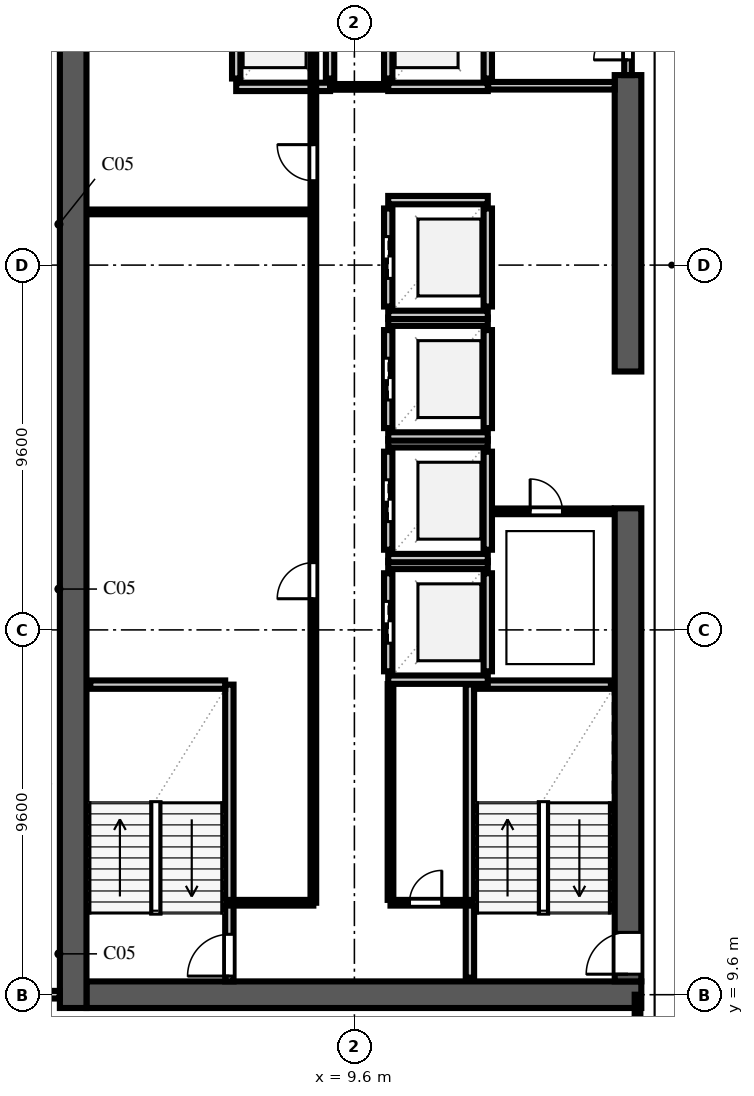
"""IFC4 building model, lengths in metres.
Left out: names, types, materials, properties, quantities, classifications, styles, units other than length and angle.
Written with IfcOpenShell. Run it as: python <this file> out.ifc"""

import sys

from ifc_helpers import new_model, si_unit, direction, frame, frame_2d, origin, place, context, subcontext, project, spatial, rectangle, extrude, element, fill, save


model = new_model("IFC4")
c1 = context("Model", 3, precision=1e-05, world=origin(), true_north=direction((0.0, 1.0)))
c2 = subcontext(c1, "Body", "Model", "MODEL_VIEW")
j1 = project(units=[si_unit("LENGTHUNIT", "METRE"), si_unit("PLANEANGLEUNIT", "RADIAN")], contexts=[c1])
p1 = place(None, origin())
s1 = spatial("IfcSite", under=j1, at=p1, CompositionType="ELEMENT")
p2 = place(p1, origin())
s2 = spatial("IfcBuilding", under=s1, at=p2, CompositionType="ELEMENT")
p3 = place(p2, frame((0.0, 0.0, 171.2)))
s3 = spatial("IfcBuildingStorey", under=s2, at=p3, CompositionType="ELEMENT", Elevation=171.2)
p4 = place(p3, frame((2.55, 9.6, 0.0), z_axis=(0.0, 0.0, 1.0), x_axis=(1.0, 0.0, 0.0)))
e1 = element("IfcWall", 1, at=p4, inside=s3, PredefinedType="SHEAR", context=c2, shape_type="SweptSolid", body=[
    extrude(rectangle(XDim=14.6, YDim=0.7, at=frame_2d((7.3, 0.0))), origin(), (0.0, 0.0, 1.0), 3.54),
])
p5 = place(p3, frame((2.2, 9.25, 0.0), z_axis=(0.0, 0.0, 1.0), x_axis=(0.0, 1.0, 0.0)))
e2 = element("IfcWall", 2, at=p5, inside=s3, PredefinedType="SHEAR", context=c2, shape_type="SweptSolid", body=[
    extrude(rectangle(XDim=39.1, YDim=0.7, at=frame_2d((19.55, 0.0))), origin(), (0.0, 0.0, 1.0), 3.54),
])
p6 = place(p3, frame((16.8, 9.95, 0.0), z_axis=(0.0, 0.0, 1.0), x_axis=(0.0, 1.0, 0.0)))
e3 = element("IfcWall", 3, at=p6, inside=s3, PredefinedType="SHEAR", context=c2, shape_type="SweptSolid", body=[
    extrude(rectangle(XDim=12.45, YDim=0.7, at=frame_2d((6.225, 0.0))), origin(), (0.0, 0.0, 1.0), 3.54),
])
p7 = place(p6, frame((0.19, 0.0, 0.0)))
e4 = element("IfcOpeningElement", 4, at=p7, cuts=e3, PredefinedType="OPENING", context=c2, shape_type="SweptSolid", body=[
    extrude(rectangle(XDim=1.1, YDim=2.2, at=frame_2d((0.55, 1.1))), frame((0.0, 0.362, 0.0), z_axis=(0.0, -1.0, 0.0), x_axis=(1.0, 0.0, 0.0)), (0.0, 0.0, 1.0), 0.724),
])
p8 = place(p3, frame((16.8, 26.0, 0.0), z_axis=(0.0, 0.0, 1.0), x_axis=(0.0, 1.0, 0.0)))
e5 = element("IfcWall", 5, at=p8, inside=s3, PredefinedType="SHEAR", context=c2, shape_type="SweptSolid", body=[
    extrude(rectangle(XDim=7.8, YDim=0.7, at=frame_2d((3.9, 0.0))), origin(), (0.0, 0.0, 1.0), 3.54),
])
p9 = place(p3, frame((6.31, 9.95, 0.0), z_axis=(0.0, 0.0, 1.0), x_axis=(0.0, 1.0, 0.0)))
e6 = element("IfcWall", 6, at=p9, inside=s3, PredefinedType="SOLIDWALL", context=c2, shape_type="SweptSolid", body=[
    extrude(rectangle(XDim=7.81, YDim=0.22, at=frame_2d((3.905, 0.0))), origin(), (0.0, 0.0, 1.0), 3.54),
])
p10 = place(p9, frame((0.14, 0.0, 0.0)))
e7 = element("IfcOpeningElement", 7, at=p10, cuts=e6, PredefinedType="OPENING", context=c2, shape_type="SweptSolid", body=[
    extrude(rectangle(XDim=1.1, YDim=2.2, at=frame_2d((0.55, 1.1))), frame((0.0, 0.122, 0.0), z_axis=(0.0, -1.0, 0.0), x_axis=(1.0, 0.0, 0.0)), (0.0, 0.0, 1.0), 0.244),
])
p11 = place(p3, frame((2.65, 17.76, 0.0), z_axis=(0.0, 0.0, 1.0), x_axis=(1.0, 0.0, 0.0)))
e8 = element("IfcWall", 8, at=p11, inside=s3, PredefinedType="SOLIDWALL", context=c2, shape_type="SweptSolid", body=[
    extrude(rectangle(XDim=3.55, YDim=0.22, at=frame_2d((1.775, 0.0))), origin(), (0.0, 0.0, 1.0), 3.54),
])
p12 = place(p3, frame((12.64, 10.05, 0.0), z_axis=(0.0, 0.0, 1.0), x_axis=(0.0, 1.0, 0.0)))
e9 = element("IfcWall", 9, at=p12, inside=s3, PredefinedType="SOLIDWALL", context=c2, shape_type="SweptSolid", body=[
    extrude(rectangle(XDim=7.71, YDim=0.22, at=frame_2d((3.855, 0.0))), origin(), (0.0, 0.0, 1.0), 3.54),
])
p13 = place(p3, frame((12.75, 17.76, 0.0), z_axis=(0.0, 0.0, 1.0), x_axis=(1.0, 0.0, 0.0)))
e10 = element("IfcWall", 10, at=p13, inside=s3, PredefinedType="SOLIDWALL", context=c2, shape_type="SweptSolid", body=[
    extrude(rectangle(XDim=3.6, YDim=0.22, at=frame_2d((1.8, 0.0))), origin(), (0.0, 0.0, 1.0), 3.54),
])
p14 = place(p3, frame((10.49, 18.11, 0.0), z_axis=(0.0, 0.0, 1.0), x_axis=(0.0, 1.0, 0.0)))
e11 = element("IfcWall", 11, at=p14, inside=s3, PredefinedType="SOLIDWALL", context=c2, shape_type="SweptSolid", body=[
    extrude(rectangle(XDim=2.58, YDim=0.22, at=frame_2d((1.29, 0.0))), origin(), (0.0, 0.0, 1.0), 3.54),
])
p15 = place(p14, frame((0.74, 0.0, 0.0)))
e12 = element("IfcOpeningElement", 12, at=p15, cuts=e11, PredefinedType="OPENING", context=c2, shape_type="SweptSolid", body=[
    extrude(rectangle(XDim=1.1, YDim=2.2, at=frame_2d((0.55, 1.1))), frame((0.0, 0.122, 0.0), z_axis=(0.0, -1.0, 0.0), x_axis=(1.0, 0.0, 0.0)), (0.0, 0.0, 1.0), 0.244),
])
p16 = place(p3, frame((13.11, 18.11, 0.0), z_axis=(0.0, 0.0, 1.0), x_axis=(0.0, 1.0, 0.0)))
e13 = element("IfcWall", 13, at=p16, inside=s3, PredefinedType="SOLIDWALL", context=c2, shape_type="SweptSolid", body=[
    extrude(rectangle(XDim=2.58, YDim=0.22, at=frame_2d((1.29, 0.0))), origin(), (0.0, 0.0, 1.0), 3.54),
])
for number, where, z_axis, x_axis in (
    (14, (10.49, 17.89, 0.0), (0.0, 0.0, 1.0), (1.0, 0.0, 0.0)),
    (15, (10.49, 20.91, 0.0), (0.0, 0.0, 1.0), (1.0, 0.0, 0.0)),
):
    element("IfcWall", number, at=place(p3, frame(where, z_axis=z_axis, x_axis=x_axis)), inside=s3, PredefinedType="SOLIDWALL", context=c2, shape_type="SweptSolid", body=[
        extrude(rectangle(XDim=2.62, YDim=0.22, at=frame_2d((1.31, 0.0))), origin(), (0.0, 0.0, 1.0), 3.54),
    ])
p17 = place(p3, frame((10.49, 21.31, 0.0), z_axis=(0.0, 0.0, 1.0), x_axis=(0.0, 1.0, 0.0)))
e16 = element("IfcWall", 16, at=p17, inside=s3, PredefinedType="SOLIDWALL", context=c2, shape_type="SweptSolid", body=[
    extrude(rectangle(XDim=2.58, YDim=0.22, at=frame_2d((1.29, 0.0))), origin(), (0.0, 0.0, 1.0), 3.54),
])
p18 = place(p17, frame((0.74, 0.0, 0.0)))
e17 = element("IfcOpeningElement", 17, at=p18, cuts=e16, PredefinedType="OPENING", context=c2, shape_type="SweptSolid", body=[
    extrude(rectangle(XDim=1.1, YDim=2.2, at=frame_2d((0.55, 1.1))), frame((0.0, 0.122, 0.0), z_axis=(0.0, -1.0, 0.0), x_axis=(1.0, 0.0, 0.0)), (0.0, 0.0, 1.0), 0.244),
])
p19 = place(p3, frame((13.11, 21.31, 0.0), z_axis=(0.0, 0.0, 1.0), x_axis=(0.0, 1.0, 0.0)))
e18 = element("IfcWall", 18, at=p19, inside=s3, PredefinedType="SOLIDWALL", context=c2, shape_type="SweptSolid", body=[
    extrude(rectangle(XDim=2.58, YDim=0.22, at=frame_2d((1.29, 0.0))), origin(), (0.0, 0.0, 1.0), 3.54),
])
for number, where, z_axis, x_axis in (
    (19, (10.49, 21.09, 0.0), (0.0, 0.0, 1.0), (1.0, 0.0, 0.0)),
    (20, (10.49, 24.11, 0.0), (0.0, 0.0, 1.0), (1.0, 0.0, 0.0)),
):
    element("IfcWall", number, at=place(p3, frame(where, z_axis=z_axis, x_axis=x_axis)), inside=s3, PredefinedType="SOLIDWALL", context=c2, shape_type="SweptSolid", body=[
        extrude(rectangle(XDim=2.62, YDim=0.22, at=frame_2d((1.31, 0.0))), origin(), (0.0, 0.0, 1.0), 3.54),
    ])
p20 = place(p3, frame((10.49, 24.51, 0.0), z_axis=(0.0, 0.0, 1.0), x_axis=(0.0, 1.0, 0.0)))
e21 = element("IfcWall", 21, at=p20, inside=s3, PredefinedType="SOLIDWALL", context=c2, shape_type="SweptSolid", body=[
    extrude(rectangle(XDim=2.58, YDim=0.22, at=frame_2d((1.29, 0.0))), origin(), (0.0, 0.0, 1.0), 3.54),
])
p21 = place(p20, frame((0.74, 0.0, 0.0)))
e22 = element("IfcOpeningElement", 22, at=p21, cuts=e21, PredefinedType="OPENING", context=c2, shape_type="SweptSolid", body=[
    extrude(rectangle(XDim=1.1, YDim=2.2, at=frame_2d((0.55, 1.1))), frame((0.0, 0.122, 0.0), z_axis=(0.0, -1.0, 0.0), x_axis=(1.0, 0.0, 0.0)), (0.0, 0.0, 1.0), 0.244),
])
p22 = place(p3, frame((13.11, 24.51, 0.0), z_axis=(0.0, 0.0, 1.0), x_axis=(0.0, 1.0, 0.0)))
e23 = element("IfcWall", 23, at=p22, inside=s3, PredefinedType="SOLIDWALL", context=c2, shape_type="SweptSolid", body=[
    extrude(rectangle(XDim=2.58, YDim=0.22, at=frame_2d((1.29, 0.0))), origin(), (0.0, 0.0, 1.0), 3.54),
])
for number, where, z_axis, x_axis in (
    (24, (10.49, 24.29, 0.0), (0.0, 0.0, 1.0), (1.0, 0.0, 0.0)),
    (25, (10.49, 27.31, 0.0), (0.0, 0.0, 1.0), (1.0, 0.0, 0.0)),
):
    element("IfcWall", number, at=place(p3, frame(where, z_axis=z_axis, x_axis=x_axis)), inside=s3, PredefinedType="SOLIDWALL", context=c2, shape_type="SweptSolid", body=[
        extrude(rectangle(XDim=2.62, YDim=0.22, at=frame_2d((1.31, 0.0))), origin(), (0.0, 0.0, 1.0), 3.54),
    ])
p23 = place(p3, frame((10.49, 27.71, 0.0), z_axis=(0.0, 0.0, 1.0), x_axis=(0.0, 1.0, 0.0)))
e26 = element("IfcWall", 26, at=p23, inside=s3, PredefinedType="SOLIDWALL", context=c2, shape_type="SweptSolid", body=[
    extrude(rectangle(XDim=2.58, YDim=0.22, at=frame_2d((1.29, 0.0))), origin(), (0.0, 0.0, 1.0), 3.54),
])
p24 = place(p23, frame((0.74, 0.0, 0.0)))
e27 = element("IfcOpeningElement", 27, at=p24, cuts=e26, PredefinedType="OPENING", context=c2, shape_type="SweptSolid", body=[
    extrude(rectangle(XDim=1.1, YDim=2.2, at=frame_2d((0.55, 1.1))), frame((0.0, 0.122, 0.0), z_axis=(0.0, -1.0, 0.0), x_axis=(1.0, 0.0, 0.0)), (0.0, 0.0, 1.0), 0.244),
])
p25 = place(p3, frame((13.11, 27.71, 0.0), z_axis=(0.0, 0.0, 1.0), x_axis=(0.0, 1.0, 0.0)))
e28 = element("IfcWall", 28, at=p25, inside=s3, PredefinedType="SOLIDWALL", context=c2, shape_type="SweptSolid", body=[
    extrude(rectangle(XDim=2.58, YDim=0.22, at=frame_2d((1.29, 0.0))), origin(), (0.0, 0.0, 1.0), 3.54),
])
for number, where, z_axis, x_axis in (
    (29, (10.49, 27.49, 0.0), (0.0, 0.0, 1.0), (1.0, 0.0, 0.0)),
    (30, (10.49, 30.51, 0.0), (0.0, 0.0, 1.0), (1.0, 0.0, 0.0)),
):
    element("IfcWall", number, at=place(p3, frame(where, z_axis=z_axis, x_axis=x_axis)), inside=s3, PredefinedType="SOLIDWALL", context=c2, shape_type="SweptSolid", body=[
        extrude(rectangle(XDim=2.62, YDim=0.22, at=frame_2d((1.31, 0.0))), origin(), (0.0, 0.0, 1.0), 3.54),
    ])
for number, where, z_axis, x_axis in (
    (31, (6.49, 33.71, 0.0), (0.0, 0.0, 1.0), (0.0, 1.0, 0.0)),
    (32, (8.96, 33.71, 0.0), (0.0, 0.0, 1.0), (0.0, 1.0, 0.0)),
):
    element("IfcWall", number, at=place(p3, frame(where, z_axis=z_axis, x_axis=x_axis)), inside=s3, PredefinedType="SOLIDWALL", context=c2, shape_type="SweptSolid", body=[
        extrude(rectangle(XDim=2.78, YDim=0.22, at=frame_2d((1.39, 0.0))), origin(), (0.0, 0.0, 1.0), 3.54),
    ])
p26 = place(p3, frame((6.49, 33.49, 0.0), z_axis=(0.0, 0.0, 1.0), x_axis=(1.0, 0.0, 0.0)))
e33 = element("IfcWall", 33, at=p26, inside=s3, PredefinedType="SOLIDWALL", context=c2, shape_type="SweptSolid", body=[
    extrude(rectangle(XDim=2.47, YDim=0.22, at=frame_2d((1.235, 0.0))), origin(), (0.0, 0.0, 1.0), 3.54),
])
for number, where, z_axis, x_axis in (
    (34, (10.49, 33.71, 0.0), (0.0, 0.0, 1.0), (0.0, 1.0, 0.0)),
    (35, (13.11, 33.71, 0.0), (0.0, 0.0, 1.0), (0.0, 1.0, 0.0)),
):
    element("IfcWall", number, at=place(p3, frame(where, z_axis=z_axis, x_axis=x_axis)), inside=s3, PredefinedType="SOLIDWALL", context=c2, shape_type="SweptSolid", body=[
        extrude(rectangle(XDim=2.78, YDim=0.22, at=frame_2d((1.39, 0.0))), origin(), (0.0, 0.0, 1.0), 3.54),
    ])
p27 = place(p3, frame((10.49, 33.49, 0.0), z_axis=(0.0, 0.0, 1.0), x_axis=(1.0, 0.0, 0.0)))
e36 = element("IfcWall", 36, at=p27, inside=s3, PredefinedType="SOLIDWALL", context=c2, shape_type="SweptSolid", body=[
    extrude(rectangle(XDim=2.62, YDim=0.22, at=frame_2d((1.31, 0.0))), origin(), (0.0, 0.0, 1.0), 3.54),
])
p28 = place(p3, frame((13.12, 33.52, 0.0), z_axis=(0.0, 0.0, 1.0), x_axis=(1.0, 0.0, 0.0)))
e37 = element("IfcWall", 37, at=p28, inside=s3, PredefinedType="SOLIDWALL", context=c2, shape_type="SweptSolid", body=[
    extrude(rectangle(XDim=3.33, YDim=0.2, at=frame_2d((1.665, 0.0))), origin(), (0.0, 0.0, 1.0), 3.54),
])
p29 = place(p3, frame((16.8, 33.8, 0.0), z_axis=(0.0, 0.0, 1.0), x_axis=(0.0, 1.0, 0.0)))
e38 = element("IfcWall", 38, at=p29, inside=s3, PredefinedType="SOLIDWALL", context=c2, shape_type="SweptSolid", body=[
    extrude(rectangle(XDim=2.6, YDim=0.2, at=frame_2d((1.3, 0.0))), origin(), (0.0, 0.0, 1.0), 3.54),
])
p30 = place(p29, frame((0.4, 0.0, 0.0)))
e39 = element("IfcOpeningElement", 39, at=p30, cuts=e38, PredefinedType="OPENING", context=c2, shape_type="SweptSolid", body=[
    extrude(rectangle(XDim=1.8, YDim=2.2, at=frame_2d((0.9, 1.1))), frame((0.0, 0.112, 0.0), z_axis=(0.0, -1.0, 0.0), x_axis=(1.0, 0.0, 0.0)), (0.0, 0.0, 1.0), 0.224),
])
p31 = place(p3, frame((8.965, 33.49, 0.0), z_axis=(0.0, 0.0, 1.0), x_axis=(1.0, 0.0, 0.0)))
e40 = element("IfcWall", 40, at=p31, inside=s3, PredefinedType="PARTITIONING", context=c2, shape_type="SweptSolid", body=[
    extrude(rectangle(XDim=1.52, YDim=0.15, at=frame_2d((0.76, 0.0))), origin(), (0.0, 0.0, 1.0), 3.54),
])
p32 = place(p3, frame((10.55, 12.02, 0.0), z_axis=(0.0, 0.0, 1.0), x_axis=(1.0, 0.0, 0.0)))
e41 = element("IfcWall", 41, at=p32, inside=s3, PredefinedType="PARTITIONING", context=c2, shape_type="SweptSolid", body=[
    extrude(rectangle(XDim=2.08, YDim=0.15, at=frame_2d((1.04, 0.0))), origin(), (0.0, 0.0, 1.0), 3.54),
])
p33 = place(p32, frame((0.5, 0.0, 0.0)))
e42 = element("IfcOpeningElement", 42, at=p33, cuts=e41, PredefinedType="OPENING", context=c2, shape_type="SweptSolid", body=[
    extrude(rectangle(XDim=0.85, YDim=2.1, at=frame_2d((0.425, 1.05))), frame((0.0, 0.087, 0.0), z_axis=(0.0, -1.0, 0.0), x_axis=(1.0, 0.0, 0.0)), (0.0, 0.0, 1.0), 0.174),
])
p34 = place(p3, frame((10.55, 12.095, 0.0), z_axis=(0.0, 0.0, 1.0), x_axis=(0.0, 1.0, 0.0)))
e43 = element("IfcWall", 43, at=p34, inside=s3, PredefinedType="PARTITIONING", context=c2, shape_type="SweptSolid", body=[
    extrude(rectangle(XDim=5.68, YDim=0.15, at=frame_2d((2.84, 0.0))), origin(), (0.0, 0.0, 1.0), 3.54),
])
p35 = place(p3, frame((13.225, 22.32, 0.0), z_axis=(0.0, 0.0, 1.0), x_axis=(1.0, 0.0, 0.0)))
e44 = element("IfcWall", 44, at=p35, inside=s3, PredefinedType="PARTITIONING", context=c2, shape_type="SweptSolid", body=[
    extrude(rectangle(XDim=3.12, YDim=0.15, at=frame_2d((1.56, 0.0))), origin(), (0.0, 0.0, 1.0), 3.54),
])
p36 = place(p35, frame((1.0, 0.0, 0.0)))
e45 = element("IfcOpeningElement", 45, at=p36, cuts=e44, PredefinedType="OPENING", context=c2, shape_type="SweptSolid", body=[
    extrude(rectangle(XDim=0.85, YDim=2.1, at=frame_2d((0.425, 1.05))), frame((0.0, 0.087, 0.0), z_axis=(0.0, -1.0, 0.0), x_axis=(1.0, 0.0, 0.0)), (0.0, 0.0, 1.0), 0.174),
])
p37 = place(p3, frame((6.32, 12.02, 0.0), z_axis=(0.0, 0.0, 1.0), x_axis=(1.0, 0.0, 0.0)))
e46 = element("IfcWall", 46, at=p37, inside=s3, PredefinedType="PARTITIONING", context=c2, shape_type="SweptSolid", body=[
    extrude(rectangle(XDim=2.2, YDim=0.15, at=frame_2d((1.1, 0.0))), origin(), (0.0, 0.0, 1.0), 3.54),
])
p38 = place(p3, frame((2.65, 30.2, 0.0), z_axis=(0.0, 0.0, 1.0), x_axis=(1.0, 0.0, 0.0)))
e47 = element("IfcWall", 47, at=p38, inside=s3, PredefinedType="PARTITIONING", context=c2, shape_type="SweptSolid", body=[
    extrude(rectangle(XDim=5.87, YDim=0.125, at=frame_2d((2.935, 0.0))), origin(), (0.0, 0.0, 1.0), 3.54),
])
p39 = place(p3, frame((8.52, 12.02, 0.0), z_axis=(0.0, 0.0, 1.0), x_axis=(0.0, 1.0, 0.0)))
e48 = element("IfcWall", 48, at=p39, inside=s3, PredefinedType="PARTITIONING", context=c2, shape_type="SweptSolid", body=[
    extrude(rectangle(XDim=24.76, YDim=0.15, at=frame_2d((12.38, 0.0))), origin(), (0.0, 0.0, 1.0), 3.54),
])
p40 = place(p39, frame((8.0, 0.0, 0.0)))
e49 = element("IfcOpeningElement", 49, at=p40, cuts=e48, PredefinedType="OPENING", context=c2, shape_type="SweptSolid", body=[
    extrude(rectangle(XDim=0.95, YDim=2.15, at=frame_2d((0.475, 1.075))), frame((0.0, 0.087, 0.0), z_axis=(0.0, -1.0, 0.0), x_axis=(1.0, 0.0, 0.0)), (0.0, 0.0, 1.0), 0.174),
])
p41 = place(p39, frame((19.0, 0.0, 0.0)))
e50 = element("IfcOpeningElement", 50, at=p41, cuts=e48, PredefinedType="OPENING", context=c2, shape_type="SweptSolid", body=[
    extrude(rectangle(XDim=0.95, YDim=2.15, at=frame_2d((0.475, 1.075))), frame((0.0, 0.087, 0.0), z_axis=(0.0, -1.0, 0.0), x_axis=(1.0, 0.0, 0.0)), (0.0, 0.0, 1.0), 0.174),
])
p42 = place(p3, frame((0.85, 9.6, 0.0), z_axis=(0.0, 0.0, 1.0), x_axis=(1.0, 0.0, 0.0)))
e51 = element("IfcWall", 51, at=p42, inside=s3, PredefinedType="SOLIDWALL", context=c2, shape_type="SweptSolid", body=[
    extrude(rectangle(XDim=0.995, YDim=0.2, at=frame_2d((0.498, 0.0))), origin(), (0.0, 0.0, 1.0), 2.923),
])
p43 = place(p3, frame((17.05, 0.22, 0.0), z_axis=(0.0, 0.0, 1.0), x_axis=(0.0, 1.0, 0.0)))
e52 = element("IfcWall", 52, at=p43, inside=s3, PredefinedType="PARTITIONING", context=c2, shape_type="SweptSolid", body=[
    extrude(rectangle(XDim=9.38, YDim=0.15, at=frame_2d((4.69, 0.0))), origin(), (0.0, 0.0, 1.0), 3.54),
])
p44 = place(p43, frame((5.58, 0.0, 0.0)))
e53 = element("IfcOpeningElement", 53, at=p44, cuts=e52, PredefinedType="OPENING", context=c2, shape_type="SweptSolid", body=[
    extrude(rectangle(XDim=1.0, YDim=2.2, at=frame_2d((0.5, 1.1))), frame((0.0, 0.087, 0.0), z_axis=(0.0, -1.0, 0.0), x_axis=(1.0, 0.0, 0.0)), (0.0, 0.0, 1.0), 0.174),
])
p45 = place(p10, origin())
e54 = element("IfcDoor", 54, at=p45, inside=s3, OperationType="SINGLE_SWING_LEFT", PredefinedType="DOOR", context=c2, shape_type="SweptSolid", body=[
    extrude(rectangle(XDim=1.1, YDim=2.2, at=frame_2d((0.55, 1.1))), frame((0.0, 0.025, 0.0), z_axis=(0.0, -1.0, 0.0), x_axis=(1.0, 0.0, 0.0)), (0.0, 0.0, 1.0), 0.05),
])
fill(e7, e54)
p46 = place(p7, origin())
e55 = element("IfcDoor", 55, at=p46, inside=s3, OperationType="SINGLE_SWING_LEFT", PredefinedType="DOOR", context=c2, shape_type="SweptSolid", body=[
    extrude(rectangle(XDim=1.1, YDim=2.2, at=frame_2d((0.55, 1.1))), frame((0.0, 0.025, 0.0), z_axis=(0.0, -1.0, 0.0), x_axis=(1.0, 0.0, 0.0)), (0.0, 0.0, 1.0), 0.05),
])
fill(e4, e55)
p47 = place(p15, origin())
e56 = element("IfcDoor", 56, at=p47, inside=s3, OperationType="DOUBLE_DOOR_SLIDING", PredefinedType="DOOR", context=c2, shape_type="SweptSolid", body=[
    extrude(rectangle(XDim=1.1, YDim=2.2, at=frame_2d((0.55, 1.1))), frame((0.0, 0.025, 0.0), z_axis=(0.0, -1.0, 0.0), x_axis=(1.0, 0.0, 0.0)), (0.0, 0.0, 1.0), 0.05),
])
fill(e12, e56)
p48 = place(p18, origin())
e57 = element("IfcDoor", 57, at=p48, inside=s3, OperationType="DOUBLE_DOOR_SLIDING", PredefinedType="DOOR", context=c2, shape_type="SweptSolid", body=[
    extrude(rectangle(XDim=1.1, YDim=2.2, at=frame_2d((0.55, 1.1))), frame((0.0, 0.025, 0.0), z_axis=(0.0, -1.0, 0.0), x_axis=(1.0, 0.0, 0.0)), (0.0, 0.0, 1.0), 0.05),
])
fill(e17, e57)
p49 = place(p21, origin())
e58 = element("IfcDoor", 58, at=p49, inside=s3, OperationType="DOUBLE_DOOR_SLIDING", PredefinedType="DOOR", context=c2, shape_type="SweptSolid", body=[
    extrude(rectangle(XDim=1.1, YDim=2.2, at=frame_2d((0.55, 1.1))), frame((0.0, 0.025, 0.0), z_axis=(0.0, -1.0, 0.0), x_axis=(1.0, 0.0, 0.0)), (0.0, 0.0, 1.0), 0.05),
])
fill(e22, e58)
p50 = place(p24, origin())
e59 = element("IfcDoor", 59, at=p50, inside=s3, OperationType="DOUBLE_DOOR_SLIDING", PredefinedType="DOOR", context=c2, shape_type="SweptSolid", body=[
    extrude(rectangle(XDim=1.1, YDim=2.2, at=frame_2d((0.55, 1.1))), frame((0.0, 0.025, 0.0), z_axis=(0.0, -1.0, 0.0), x_axis=(1.0, 0.0, 0.0)), (0.0, 0.0, 1.0), 0.05),
])
fill(e27, e59)
p51 = place(p30, origin())
e60 = element("IfcDoor", 60, at=p51, inside=s3, OperationType="DOUBLE_DOOR_SINGLE_SWING", PredefinedType="DOOR", context=c2, shape_type="SweptSolid", body=[
    extrude(rectangle(XDim=1.8, YDim=2.2, at=frame_2d((0.9, 1.1))), frame((0.0, 0.025, 0.0), z_axis=(0.0, -1.0, 0.0), x_axis=(1.0, 0.0, 0.0)), (0.0, 0.0, 1.0), 0.05),
])
fill(e39, e60)
p52 = place(p33, origin())
e61 = element("IfcDoor", 61, at=p52, inside=s3, OperationType="SINGLE_SWING_RIGHT", PredefinedType="DOOR", context=c2, shape_type="SweptSolid", body=[
    extrude(rectangle(XDim=0.85, YDim=2.1, at=frame_2d((0.425, 1.05))), frame((0.0, 0.025, 0.0), z_axis=(0.0, -1.0, 0.0), x_axis=(1.0, 0.0, 0.0)), (0.0, 0.0, 1.0), 0.05),
])
fill(e42, e61)
p53 = place(p36, origin())
e62 = element("IfcDoor", 62, at=p53, inside=s3, OperationType="SINGLE_SWING_LEFT", PredefinedType="DOOR", context=c2, shape_type="SweptSolid", body=[
    extrude(rectangle(XDim=0.85, YDim=2.1, at=frame_2d((0.425, 1.05))), frame((0.0, 0.025, 0.0), z_axis=(0.0, -1.0, 0.0), x_axis=(1.0, 0.0, 0.0)), (0.0, 0.0, 1.0), 0.05),
])
fill(e45, e62)
p54 = place(p40, origin())
e63 = element("IfcDoor", 63, at=p54, inside=s3, OperationType="SINGLE_SWING_LEFT", PredefinedType="DOOR", context=c2, shape_type="SweptSolid", body=[
    extrude(rectangle(XDim=0.95, YDim=2.15, at=frame_2d((0.475, 1.075))), frame((0.0, 0.025, 0.0), z_axis=(0.0, -1.0, 0.0), x_axis=(1.0, 0.0, 0.0)), (0.0, 0.0, 1.0), 0.05),
])
fill(e49, e63)
p55 = place(p41, origin())
e64 = element("IfcDoor", 64, at=p55, inside=s3, OperationType="SINGLE_SWING_RIGHT", PredefinedType="DOOR", context=c2, shape_type="SweptSolid", body=[
    extrude(rectangle(XDim=0.95, YDim=2.15, at=frame_2d((0.475, 1.075))), frame((0.0, 0.025, 0.0), z_axis=(0.0, -1.0, 0.0), x_axis=(1.0, 0.0, 0.0)), (0.0, 0.0, 1.0), 0.05),
])
fill(e50, e64)
save(model, sys.argv[1])
